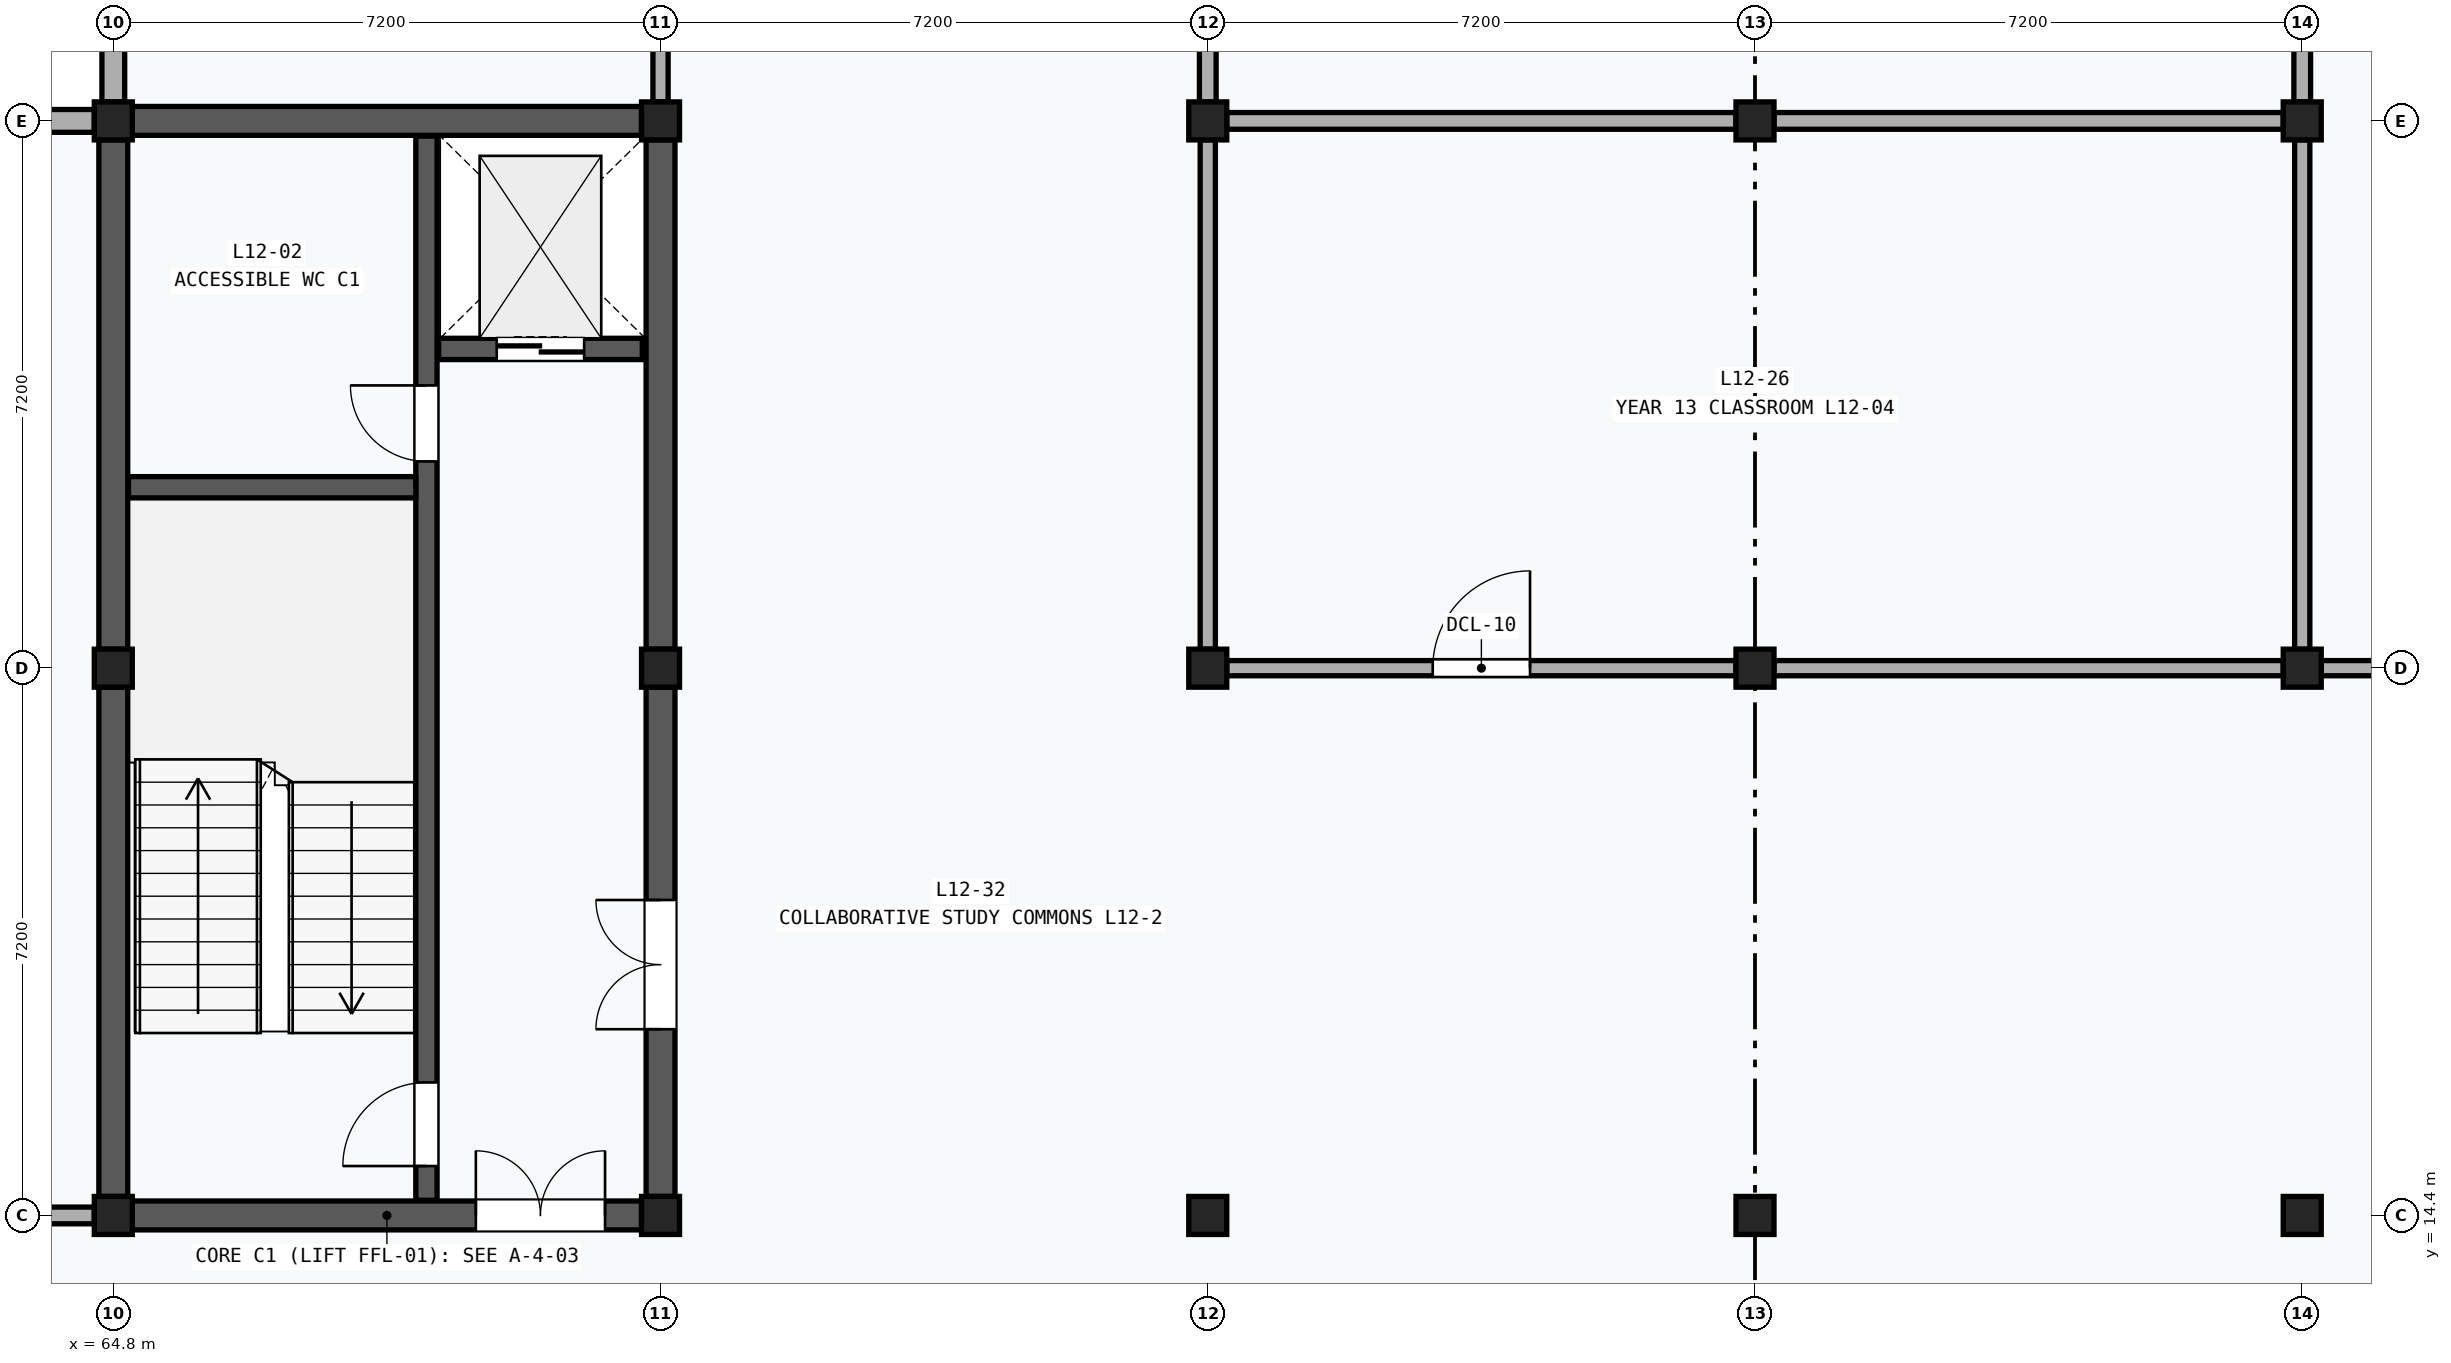
"""IFC4 building model, lengths in metres.
Left out: names, types, materials, properties, quantities, classifications, styles, units other than length and angle.
Written with IfcOpenShell. Run it as: python <this file> out.ifc"""

import sys

from ifc_helpers import new_model, si_unit, direction, frame, frame_2d, origin, origin_2d, place, context, subcontext, project, spatial, rectangle, extrude, element, fill, save


model = new_model("IFC4")
c1 = context("Model", 3, precision=1e-05, world=origin(), true_north=direction((0.0, 1.0)))
c2 = subcontext(c1, "Body", "Model", "MODEL_VIEW")
j1 = project(units=[si_unit("LENGTHUNIT", "METRE"), si_unit("PLANEANGLEUNIT", "RADIAN")], contexts=[c1])
p1 = place(None, origin())
s1 = spatial("IfcSite", under=j1, at=p1, CompositionType="ELEMENT")
p2 = place(p1, origin())
s2 = spatial("IfcBuilding", under=s1, at=p2, CompositionType="ELEMENT")
p3 = place(p2, frame((0.0, 0.0, 51.0)))
s3 = spatial("IfcBuildingStorey", under=s2, at=p3, CompositionType="ELEMENT", Elevation=51.0)
for number, where, z_axis, x_axis in (
    (1, (64.8, 14.4, 0.0), (0.0, 0.0, 1.0), (1.0, 0.0, 0.0)),
    (2, (64.8, 21.6, 0.0), (0.0, 0.0, 1.0), (1.0, 0.0, 0.0)),
    (3, (64.8, 28.8, 0.0), (0.0, 0.0, 1.0), (1.0, 0.0, 0.0)),
    (4, (72.0, 14.4, 0.0), (0.0, 0.0, 1.0), (1.0, 0.0, 0.0)),
    (5, (72.0, 21.6, 0.0), (0.0, 0.0, 1.0), (1.0, 0.0, 0.0)),
    (6, (72.0, 28.8, 0.0), (0.0, 0.0, 1.0), (1.0, 0.0, 0.0)),
    (7, (79.2, 14.4, 0.0), (0.0, 0.0, 1.0), (1.0, 0.0, 0.0)),
    (8, (79.2, 21.6, 0.0), (0.0, 0.0, 1.0), (1.0, 0.0, 0.0)),
    (9, (79.2, 28.8, 0.0), (0.0, 0.0, 1.0), (1.0, 0.0, 0.0)),
    (10, (86.4, 14.4, 0.0), (0.0, 0.0, 1.0), (1.0, 0.0, 0.0)),
    (11, (86.4, 21.6, 0.0), (0.0, 0.0, 1.0), (1.0, 0.0, 0.0)),
    (12, (86.4, 28.8, 0.0), (0.0, 0.0, 1.0), (1.0, 0.0, 0.0)),
    (13, (93.6, 14.4, 0.0), (0.0, 0.0, 1.0), (1.0, 0.0, 0.0)),
    (14, (93.6, 21.6, 0.0), (0.0, 0.0, 1.0), (1.0, 0.0, 0.0)),
    (15, (93.6, 28.8, 0.0), (0.0, 0.0, 1.0), (1.0, 0.0, 0.0)),
):
    element("IfcColumn", number, at=place(p3, frame(where, z_axis=z_axis, x_axis=x_axis)), inside=s3, PredefinedType="COLUMN", context=c2, shape_type="SweptSolid", body=[
        extrude(rectangle(XDim=0.5, YDim=0.5, at=origin_2d()), origin(), (0.0, 0.0, 1.0), 4.0),
    ])
p4 = place(p3, frame((57.78, 28.8, 0.0), z_axis=(0.0, 0.0, 1.0), x_axis=(1.0, 0.0, 0.0)))
e16 = element("IfcWall", 16, at=p4, inside=s3, PredefinedType="SOLIDWALL", context=c2, shape_type="SweptSolid", body=[
    extrude(rectangle(XDim=6.77, YDim=0.3, at=frame_2d((3.385, 0.0))), origin(), (0.0, 0.0, 1.0), 3.17),
])
p5 = place(p4, frame((2.635, 0.0, 1.1)))
e17 = element("IfcOpeningElement", 17, at=p5, cuts=e16, PredefinedType="OPENING", context=c2, shape_type="SweptSolid", body=[
    extrude(rectangle(XDim=1.5, YDim=1.35, at=frame_2d((0.75, 0.675))), frame((0.0, 0.162, 0.0), z_axis=(0.0, -1.0, 0.0), x_axis=(1.0, 0.0, 0.0)), (0.0, 0.0, 1.0), 0.324),
])
p6 = place(p3, frame((64.8, 29.05, 0.0), z_axis=(0.0, 0.0, 1.0), x_axis=(0.0, 1.0, 0.0)))
e18 = element("IfcWall", 18, at=p6, inside=s3, PredefinedType="SOLIDWALL", context=c2, shape_type="SweptSolid", body=[
    extrude(rectangle(XDim=6.7, YDim=0.3, at=frame_2d((3.35, 0.0))), origin(), (0.0, 0.0, 1.0), 3.17),
])
p7 = place(p3, frame((64.8, 14.65, 0.0), z_axis=(0.0, 0.0, 1.0), x_axis=(0.0, 1.0, 0.0)))
e19 = element("IfcWall", 19, at=p7, inside=s3, PredefinedType="SHEAR", context=c2, shape_type="SweptSolid", body=[
    extrude(rectangle(XDim=6.7, YDim=0.38, at=frame_2d((3.35, 0.0))), origin(), (0.0, 0.0, 1.0), 3.09),
])
p8 = place(p3, frame((64.8, 21.85, 0.0), z_axis=(0.0, 0.0, 1.0), x_axis=(0.0, 1.0, 0.0)))
e20 = element("IfcWall", 20, at=p8, inside=s3, PredefinedType="SHEAR", context=c2, shape_type="SweptSolid", body=[
    extrude(rectangle(XDim=6.7, YDim=0.38, at=frame_2d((3.35, 0.0))), origin(), (0.0, 0.0, 1.0), 3.09),
])
p9 = place(p3, frame((72.0, 14.65, 0.0), z_axis=(0.0, 0.0, 1.0), x_axis=(0.0, 1.0, 0.0)))
e21 = element("IfcWall", 21, at=p9, inside=s3, PredefinedType="SHEAR", context=c2, shape_type="SweptSolid", body=[
    extrude(rectangle(XDim=6.7, YDim=0.38, at=frame_2d((3.35, 0.0))), origin(), (0.0, 0.0, 1.0), 3.09),
])
p10 = place(p9, frame((2.2, 0.0, 0.0)))
e22 = element("IfcOpeningElement", 22, at=p10, cuts=e21, PredefinedType="OPENING", context=c2, shape_type="SweptSolid", body=[
    extrude(rectangle(XDim=1.7, YDim=2.25, at=frame_2d((0.85, 1.125))), frame((0.0, 0.202, 0.0), z_axis=(0.0, -1.0, 0.0), x_axis=(1.0, 0.0, 0.0)), (0.0, 0.0, 1.0), 0.404),
])
p11 = place(p3, frame((72.0, 21.85, 0.0), z_axis=(0.0, 0.0, 1.0), x_axis=(0.0, 1.0, 0.0)))
e23 = element("IfcWall", 23, at=p11, inside=s3, PredefinedType="SHEAR", context=c2, shape_type="SweptSolid", body=[
    extrude(rectangle(XDim=6.7, YDim=0.38, at=frame_2d((3.35, 0.0))), origin(), (0.0, 0.0, 1.0), 3.09),
])
p12 = place(p3, frame((65.05, 14.4, 0.0), z_axis=(0.0, 0.0, 1.0), x_axis=(1.0, 0.0, 0.0)))
e24 = element("IfcWall", 24, at=p12, inside=s3, PredefinedType="SHEAR", context=c2, shape_type="SweptSolid", body=[
    extrude(rectangle(XDim=6.7, YDim=0.38, at=frame_2d((3.35, 0.0))), origin(), (0.0, 0.0, 1.0), 3.09),
])
p13 = place(p12, frame((4.52, 0.0, 0.0)))
e25 = element("IfcOpeningElement", 25, at=p13, cuts=e24, PredefinedType="OPENING", context=c2, shape_type="SweptSolid", body=[
    extrude(rectangle(XDim=1.7, YDim=2.25, at=frame_2d((0.85, 1.125))), frame((0.0, 0.202, 0.0), z_axis=(0.0, -1.0, 0.0), x_axis=(1.0, 0.0, 0.0)), (0.0, 0.0, 1.0), 0.404),
])
p14 = place(p3, frame((65.05, 28.8, 0.0), z_axis=(0.0, 0.0, 1.0), x_axis=(1.0, 0.0, 0.0)))
e26 = element("IfcWall", 26, at=p14, inside=s3, PredefinedType="SHEAR", context=c2, shape_type="SweptSolid", body=[
    extrude(rectangle(XDim=6.7, YDim=0.38, at=frame_2d((3.35, 0.0))), origin(), (0.0, 0.0, 1.0), 3.09),
])
p15 = place(p3, frame((68.92, 14.6, 0.0), z_axis=(0.0, 0.0, 1.0), x_axis=(0.0, 1.0, 0.0)))
e27 = element("IfcWall", 27, at=p15, inside=s3, PredefinedType="SHEAR", context=c2, shape_type="SweptSolid", body=[
    extrude(rectangle(XDim=14.0, YDim=0.28, at=frame_2d((7.0, 0.0))), origin(), (0.0, 0.0, 1.0), 3.78),
])
p16 = place(p15, frame((0.45, 0.0, 0.0)))
e28 = element("IfcOpeningElement", 28, at=p16, cuts=e27, PredefinedType="OPENING", context=c2, shape_type="SweptSolid", body=[
    extrude(rectangle(XDim=1.1, YDim=2.15, at=frame_2d((0.55, 1.075))), frame((0.0, 0.152, 0.0), z_axis=(0.0, -1.0, 0.0), x_axis=(1.0, 0.0, 0.0)), (0.0, 0.0, 1.0), 0.304),
])
p17 = place(p15, frame((9.72, 0.0, 0.0)))
e29 = element("IfcOpeningElement", 29, at=p17, cuts=e27, PredefinedType="OPENING", context=c2, shape_type="SweptSolid", body=[
    extrude(rectangle(XDim=1.0, YDim=2.15, at=frame_2d((0.5, 1.075))), frame((0.0, 0.152, 0.0), z_axis=(0.0, -1.0, 0.0), x_axis=(1.0, 0.0, 0.0)), (0.0, 0.0, 1.0), 0.304),
])
p18 = place(p3, frame((65.0, 23.98, 0.0), z_axis=(0.0, 0.0, 1.0), x_axis=(1.0, 0.0, 0.0)))
e30 = element("IfcWall", 30, at=p18, inside=s3, PredefinedType="SHEAR", context=c2, shape_type="SweptSolid", body=[
    extrude(rectangle(XDim=3.78, YDim=0.28, at=frame_2d((1.89, 0.0))), origin(), (0.0, 0.0, 1.0), 3.78),
])
p19 = place(p3, frame((69.08, 25.8, 0.0), z_axis=(0.0, 0.0, 1.0), x_axis=(1.0, 0.0, 0.0)))
e31 = element("IfcWall", 31, at=p19, inside=s3, PredefinedType="SHEAR", context=c2, shape_type="SweptSolid", body=[
    extrude(rectangle(XDim=2.68, YDim=0.28, at=frame_2d((1.34, 0.0))), origin(), (0.0, 0.0, 1.0), 3.78),
])
p20 = place(p19, frame((0.765, 0.0, 0.0)))
e32 = element("IfcOpeningElement", 32, at=p20, cuts=e31, PredefinedType="OPENING", context=c2, shape_type="SweptSolid", body=[
    extrude(rectangle(XDim=1.15, YDim=2.2, at=frame_2d((0.575, 1.1))), frame((0.0, 0.152, 0.0), z_axis=(0.0, -1.0, 0.0), x_axis=(1.0, 0.0, 0.0)), (0.0, 0.0, 1.0), 0.304),
])
p21 = place(p3, frame((57.85, 14.4, 0.0), z_axis=(0.0, 0.0, 1.0), x_axis=(1.0, 0.0, 0.0)))
e33 = element("IfcWall", 33, at=p21, inside=s3, PredefinedType="PARTITIONING", context=c2, shape_type="SweptSolid", body=[
    extrude(rectangle(XDim=6.7, YDim=0.22, at=frame_2d((3.35, 0.0))), origin(), (0.0, 0.0, 1.0), 3.09),
])
p22 = place(p21, frame((2.81, 0.0, 0.0)))
e34 = element("IfcOpeningElement", 34, at=p22, cuts=e33, PredefinedType="OPENING", context=c2, shape_type="SweptSolid", body=[
    extrude(rectangle(XDim=1.08, YDim=2.18, at=frame_2d((0.54, 1.09))), frame((0.0, 0.122, 0.0), z_axis=(0.0, -1.0, 0.0), x_axis=(1.0, 0.0, 0.0)), (0.0, 0.0, 1.0), 0.244),
])
p23 = place(p3, frame((79.45, 28.8, 0.0), z_axis=(0.0, 0.0, 1.0), x_axis=(1.0, 0.0, 0.0)))
e35 = element("IfcWall", 35, at=p23, inside=s3, PredefinedType="PARTITIONING", context=c2, shape_type="SweptSolid", body=[
    extrude(rectangle(XDim=6.7, YDim=0.22, at=frame_2d((3.35, 0.0))), origin(), (0.0, 0.0, 1.0), 3.09),
])
p24 = place(p3, frame((79.2, 29.05, 0.0), z_axis=(0.0, 0.0, 1.0), x_axis=(0.0, 1.0, 0.0)))
e36 = element("IfcWall", 36, at=p24, inside=s3, PredefinedType="PARTITIONING", context=c2, shape_type="SweptSolid", body=[
    extrude(rectangle(XDim=6.7, YDim=0.22, at=frame_2d((3.35, 0.0))), origin(), (0.0, 0.0, 1.0), 3.09),
])
p25 = place(p24, frame((2.79, 0.0, 0.0)))
e37 = element("IfcOpeningElement", 37, at=p25, cuts=e36, PredefinedType="OPENING", context=c2, shape_type="SweptSolid", body=[
    extrude(rectangle(XDim=1.12, YDim=2.2, at=frame_2d((0.56, 1.1))), frame((0.0, 0.122, 0.0), z_axis=(0.0, -1.0, 0.0), x_axis=(1.0, 0.0, 0.0)), (0.0, 0.0, 1.0), 0.244),
])
p26 = place(p3, frame((86.65, 28.8, 0.0), z_axis=(0.0, 0.0, 1.0), x_axis=(1.0, 0.0, 0.0)))
e38 = element("IfcWall", 38, at=p26, inside=s3, PredefinedType="PARTITIONING", context=c2, shape_type="SweptSolid", body=[
    extrude(rectangle(XDim=6.7, YDim=0.22, at=frame_2d((3.35, 0.0))), origin(), (0.0, 0.0, 1.0), 3.09),
])
p27 = place(p3, frame((93.6, 29.05, 0.0), z_axis=(0.0, 0.0, 1.0), x_axis=(0.0, 1.0, 0.0)))
e39 = element("IfcWall", 39, at=p27, inside=s3, PredefinedType="PARTITIONING", context=c2, shape_type="SweptSolid", body=[
    extrude(rectangle(XDim=6.7, YDim=0.22, at=frame_2d((3.35, 0.0))), origin(), (0.0, 0.0, 1.0), 3.09),
])
p28 = place(p3, frame((93.85, 21.6, 0.0), z_axis=(0.0, 0.0, 1.0), x_axis=(1.0, 0.0, 0.0)))
e40 = element("IfcWall", 40, at=p28, inside=s3, PredefinedType="PARTITIONING", context=c2, shape_type="SweptSolid", body=[
    extrude(rectangle(XDim=6.7, YDim=0.2, at=frame_2d((3.35, 0.0))), origin(), (0.0, 0.0, 1.0), 3.09),
])
p29 = place(p28, frame((2.77, 0.0, 0.0)))
e41 = element("IfcOpeningElement", 41, at=p29, cuts=e40, PredefinedType="OPENING", context=c2, shape_type="SweptSolid", body=[
    extrude(rectangle(XDim=1.16, YDim=2.22, at=frame_2d((0.58, 1.11))), frame((0.0, 0.112, 0.0), z_axis=(0.0, -1.0, 0.0), x_axis=(1.0, 0.0, 0.0)), (0.0, 0.0, 1.0), 0.224),
])
p30 = place(p3, frame((93.6, 21.85, 0.0), z_axis=(0.0, 0.0, 1.0), x_axis=(0.0, 1.0, 0.0)))
e42 = element("IfcWall", 42, at=p30, inside=s3, PredefinedType="PARTITIONING", context=c2, shape_type="SweptSolid", body=[
    extrude(rectangle(XDim=6.7, YDim=0.2, at=frame_2d((3.35, 0.0))), origin(), (0.0, 0.0, 1.0), 3.09),
])
p31 = place(p3, frame((72.0, 29.05, 0.0), z_axis=(0.0, 0.0, 1.0), x_axis=(0.0, 1.0, 0.0)))
e43 = element("IfcWall", 43, at=p31, inside=s3, PredefinedType="PARTITIONING", context=c2, shape_type="SweptSolid", body=[
    extrude(rectangle(XDim=6.7, YDim=0.2, at=frame_2d((3.35, 0.0))), origin(), (0.0, 0.0, 1.0), 3.09),
])
p32 = place(p31, frame((2.75, 0.0, 0.0)))
e44 = element("IfcOpeningElement", 44, at=p32, cuts=e43, PredefinedType="OPENING", context=c2, shape_type="SweptSolid", body=[
    extrude(rectangle(XDim=1.2, YDim=2.24, at=frame_2d((0.6, 1.12))), frame((0.0, 0.112, 0.0), z_axis=(0.0, -1.0, 0.0), x_axis=(1.0, 0.0, 0.0)), (0.0, 0.0, 1.0), 0.224),
])
p33 = place(p3, frame((79.45, 21.6, 0.0), z_axis=(0.0, 0.0, 1.0), x_axis=(1.0, 0.0, 0.0)))
e45 = element("IfcWall", 45, at=p33, inside=s3, PredefinedType="PARTITIONING", context=c2, shape_type="SweptSolid", body=[
    extrude(rectangle(XDim=6.7, YDim=0.2, at=frame_2d((3.35, 0.0))), origin(), (0.0, 0.0, 1.0), 3.09),
])
p34 = place(p33, frame((2.71, 0.0, 0.0)))
e46 = element("IfcOpeningElement", 46, at=p34, cuts=e45, PredefinedType="OPENING", context=c2, shape_type="SweptSolid", body=[
    extrude(rectangle(XDim=1.28, YDim=2.28, at=frame_2d((0.64, 1.14))), frame((0.0, 0.112, 0.0), z_axis=(0.0, -1.0, 0.0), x_axis=(1.0, 0.0, 0.0)), (0.0, 0.0, 1.0), 0.224),
])
p35 = place(p3, frame((79.2, 21.85, 0.0), z_axis=(0.0, 0.0, 1.0), x_axis=(0.0, 1.0, 0.0)))
e47 = element("IfcWall", 47, at=p35, inside=s3, PredefinedType="PARTITIONING", context=c2, shape_type="SweptSolid", body=[
    extrude(rectangle(XDim=6.7, YDim=0.2, at=frame_2d((3.35, 0.0))), origin(), (0.0, 0.0, 1.0), 3.09),
])
p36 = place(p3, frame((86.65, 21.6, 0.0), z_axis=(0.0, 0.0, 1.0), x_axis=(1.0, 0.0, 0.0)))
e48 = element("IfcWall", 48, at=p36, inside=s3, PredefinedType="PARTITIONING", context=c2, shape_type="SweptSolid", body=[
    extrude(rectangle(XDim=6.7, YDim=0.2, at=frame_2d((3.35, 0.0))), origin(), (0.0, 0.0, 1.0), 3.09),
])
p37 = place(p10, origin())
e49 = element("IfcDoor", 49, at=p37, inside=s3, OperationType="DOUBLE_DOOR_SINGLE_SWING", PredefinedType="DOOR", context=c2, shape_type="SweptSolid", body=[
    extrude(rectangle(XDim=1.7, YDim=2.25, at=frame_2d((0.85, 1.125))), frame((0.0, 0.025, 0.0), z_axis=(0.0, -1.0, 0.0), x_axis=(1.0, 0.0, 0.0)), (0.0, 0.0, 1.0), 0.05),
])
fill(e22, e49)
p38 = place(p13, origin())
e50 = element("IfcDoor", 50, at=p38, inside=s3, OperationType="DOUBLE_DOOR_SINGLE_SWING", PredefinedType="DOOR", context=c2, shape_type="SweptSolid", body=[
    extrude(rectangle(XDim=1.7, YDim=2.25, at=frame_2d((0.85, 1.125))), frame((0.0, 0.025, 0.0), z_axis=(0.0, -1.0, 0.0), x_axis=(1.0, 0.0, 0.0)), (0.0, 0.0, 1.0), 0.05),
])
fill(e25, e50)
p39 = place(p16, origin())
e51 = element("IfcDoor", 51, at=p39, inside=s3, OperationType="SINGLE_SWING_LEFT", PredefinedType="DOOR", context=c2, shape_type="SweptSolid", body=[
    extrude(rectangle(XDim=1.1, YDim=2.15, at=frame_2d((0.55, 1.075))), frame((0.0, 0.025, 0.0), z_axis=(0.0, -1.0, 0.0), x_axis=(1.0, 0.0, 0.0)), (0.0, 0.0, 1.0), 0.05),
])
fill(e28, e51)
p40 = place(p17, origin())
e52 = element("IfcDoor", 52, at=p40, inside=s3, OperationType="SINGLE_SWING_RIGHT", PredefinedType="DOOR", context=c2, shape_type="SweptSolid", body=[
    extrude(rectangle(XDim=1.0, YDim=2.15, at=frame_2d((0.5, 1.075))), frame((0.0, 0.025, 0.0), z_axis=(0.0, -1.0, 0.0), x_axis=(1.0, 0.0, 0.0)), (0.0, 0.0, 1.0), 0.05),
])
fill(e29, e52)
p41 = place(p20, frame((1.15, 0.0, 0.0), z_axis=(0.0, 0.0, 1.0), x_axis=(-1.0, 0.0, 0.0)))
e53 = element("IfcDoor", 53, at=p41, inside=s3, OperationType="DOUBLE_DOOR_SLIDING", PredefinedType="DOOR", context=c2, shape_type="SweptSolid", body=[
    extrude(rectangle(XDim=1.15, YDim=2.2, at=frame_2d((0.575, 1.1))), frame((0.0, 0.025, 0.0), z_axis=(0.0, -1.0, 0.0), x_axis=(1.0, 0.0, 0.0)), (0.0, 0.0, 1.0), 0.05),
])
fill(e32, e53)
p42 = place(p34, origin())
e54 = element("IfcDoor", 54, at=p42, inside=s3, OperationType="SINGLE_SWING_RIGHT", PredefinedType="DOOR", context=c2, shape_type="SweptSolid", body=[
    extrude(rectangle(XDim=1.28, YDim=2.28, at=frame_2d((0.64, 1.14))), frame((0.0, 0.025, 0.0), z_axis=(0.0, -1.0, 0.0), x_axis=(1.0, 0.0, 0.0)), (0.0, 0.0, 1.0), 0.05),
])
fill(e46, e54)
save(model, sys.argv[1])
